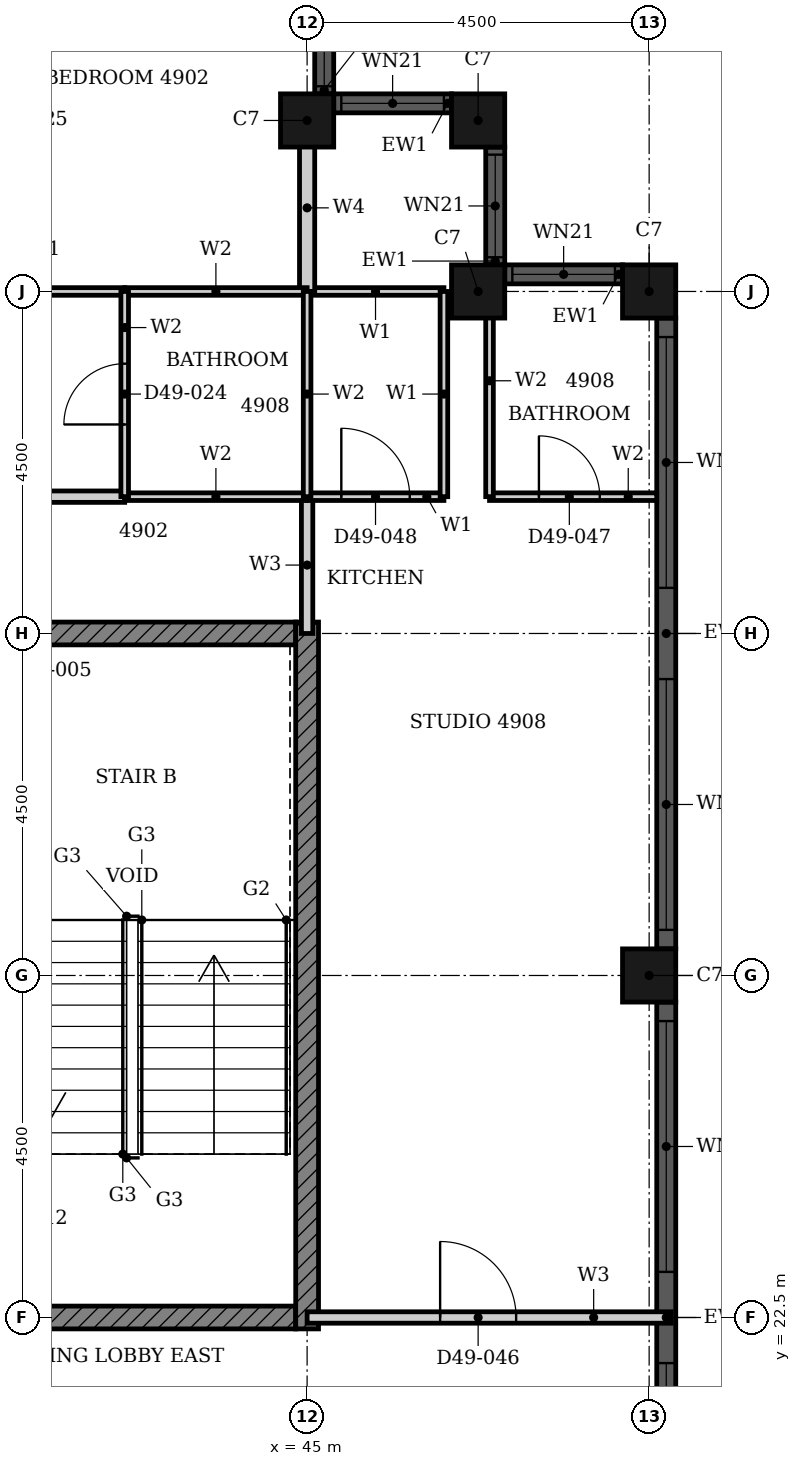
"""IFC4 building model, lengths in metres.
Left out: names, types, materials, properties, quantities, classifications, styles, units other than length and angle.
Written with IfcOpenShell. Run it as: python <this file> out.ifc"""

import sys

from ifc_helpers import new_model, si_unit, direction, frame, frame_2d, origin, origin_2d, place, context, subcontext, project, spatial, rectangle, hollow_rectangle, extrude, element, fill, save


model = new_model("IFC4")
c1 = context("Model", 3, precision=1e-05, world=origin(), true_north=direction((0.0, 1.0)))
c2 = subcontext(c1, "Body", "Model", "MODEL_VIEW")
j1 = project(units=[si_unit("LENGTHUNIT", "METRE"), si_unit("PLANEANGLEUNIT", "RADIAN")], contexts=[c1])
p1 = place(None, origin())
s1 = spatial("IfcSite", under=j1, at=p1, CompositionType="ELEMENT")
p2 = place(p1, origin())
s2 = spatial("IfcBuilding", under=s1, at=p2, CompositionType="ELEMENT")
p3 = place(p2, frame((0.0, 0.0, 196.1)))
s3 = spatial("IfcBuildingStorey", under=s2, at=p3, CompositionType="ELEMENT", Elevation=196.1)
for number, where, z_axis, x_axis in (
    (1, (49.5, 27.0, 0.0), (0.0, 0.0, 1.0), (1.0, 0.0, 0.0)),
    (2, (49.5, 36.0, 0.0), (0.0, 0.0, 1.0), (1.0, 0.0, 0.0)),
    (3, (47.25, 36.0, 0.0), (0.0, 0.0, 1.0), (1.0, 0.0, 0.0)),
    (4, (47.25, 38.25, 0.0), (0.0, 0.0, 1.0), (1.0, 0.0, 0.0)),
    (5, (45.0, 38.25, 0.0), (0.0, 0.0, 1.0), (1.0, 0.0, 0.0)),
):
    element("IfcColumn", number, at=place(p3, frame(where, z_axis=z_axis, x_axis=x_axis)), inside=s3, PredefinedType="COLUMN", context=c2, shape_type="SweptSolid", body=[
        extrude(hollow_rectangle(XDim=0.7, YDim=0.7, WallThickness=0.022, at=origin_2d()), origin(), (0.0, 0.0, 1.0), 3.7),
    ])
p4 = place(p3, frame((49.725, 18.35, 0.0), z_axis=(0.0, 0.0, 1.0), x_axis=(0.0, 1.0, 0.0)))
e6 = element("IfcWall", 6, at=p4, inside=s3, PredefinedType="SOLIDWALL", context=c2, shape_type="SweptSolid", body=[
    extrude(rectangle(XDim=8.3, YDim=0.25, at=frame_2d((4.15, 0.0))), origin(), (0.0, 0.0, 1.0), 3.7),
])
p5 = place(p4, frame((0.25, 0.0, 0.45)))
e7 = element("IfcOpeningElement", 7, at=p5, cuts=e6, PredefinedType="OPENING", context=c2, shape_type="SweptSolid", body=[
    extrude(rectangle(XDim=3.3, YDim=2.3, at=frame_2d((1.65, 1.15))), frame((0.0, 0.135, 0.0), z_axis=(0.0, -1.0, 0.0), x_axis=(1.0, 0.0, 0.0)), (0.0, 0.0, 1.0), 0.27),
])
p6 = place(p4, frame((4.75, 0.0, 0.45)))
e8 = element("IfcOpeningElement", 8, at=p6, cuts=e6, PredefinedType="OPENING", context=c2, shape_type="SweptSolid", body=[
    extrude(rectangle(XDim=3.3, YDim=2.3, at=frame_2d((1.65, 1.15))), frame((0.0, 0.135, 0.0), z_axis=(0.0, -1.0, 0.0), x_axis=(1.0, 0.0, 0.0)), (0.0, 0.0, 1.0), 0.27),
])
p7 = place(p3, frame((49.725, 27.35, 0.0), z_axis=(0.0, 0.0, 1.0), x_axis=(0.0, 1.0, 0.0)))
e9 = element("IfcWall", 9, at=p7, inside=s3, PredefinedType="SOLIDWALL", context=c2, shape_type="SweptSolid", body=[
    extrude(rectangle(XDim=8.3, YDim=0.25, at=frame_2d((4.15, 0.0))), origin(), (0.0, 0.0, 1.0), 3.7),
])
p8 = place(p7, frame((0.25, 0.0, 0.45)))
e10 = element("IfcOpeningElement", 10, at=p8, cuts=e9, PredefinedType="OPENING", context=c2, shape_type="SweptSolid", body=[
    extrude(rectangle(XDim=3.3, YDim=2.3, at=frame_2d((1.65, 1.15))), frame((0.0, 0.135, 0.0), z_axis=(0.0, -1.0, 0.0), x_axis=(1.0, 0.0, 0.0)), (0.0, 0.0, 1.0), 0.27),
])
p9 = place(p7, frame((4.75, 0.0, 0.45)))
e11 = element("IfcOpeningElement", 11, at=p9, cuts=e9, PredefinedType="OPENING", context=c2, shape_type="SweptSolid", body=[
    extrude(rectangle(XDim=3.3, YDim=2.3, at=frame_2d((1.65, 1.15))), frame((0.0, 0.135, 0.0), z_axis=(0.0, -1.0, 0.0), x_axis=(1.0, 0.0, 0.0)), (0.0, 0.0, 1.0), 0.27),
])
p10 = place(p3, frame((49.15, 36.225, 0.0), z_axis=(0.0, 0.0, 1.0), x_axis=(-1.0, 0.0, 0.0)))
e12 = element("IfcWall", 12, at=p10, inside=s3, PredefinedType="SOLIDWALL", context=c2, shape_type="SweptSolid", body=[
    extrude(rectangle(XDim=1.55, YDim=0.25, at=frame_2d((0.775, 0.0))), origin(), (0.0, 0.0, 1.0), 3.7),
])
p11 = place(p10, frame((0.1, 0.0, 0.9)))
e13 = element("IfcOpeningElement", 13, at=p11, cuts=e12, PredefinedType="OPENING", context=c2, shape_type="SweptSolid", body=[
    extrude(rectangle(XDim=1.35, YDim=1.85, at=frame_2d((0.675, 0.925))), frame((0.0, 0.135, 0.0), z_axis=(0.0, -1.0, 0.0), x_axis=(1.0, 0.0, 0.0)), (0.0, 0.0, 1.0), 0.27),
])
p12 = place(p3, frame((47.475, 36.35, 0.0), z_axis=(0.0, 0.0, 1.0), x_axis=(0.0, 1.0, 0.0)))
e14 = element("IfcWall", 14, at=p12, inside=s3, PredefinedType="SOLIDWALL", context=c2, shape_type="SweptSolid", body=[
    extrude(rectangle(XDim=1.55, YDim=0.25, at=frame_2d((0.775, 0.0))), origin(), (0.0, 0.0, 1.0), 3.7),
])
p13 = place(p12, frame((0.1, 0.0, 0.9)))
e15 = element("IfcOpeningElement", 15, at=p13, cuts=e14, PredefinedType="OPENING", context=c2, shape_type="SweptSolid", body=[
    extrude(rectangle(XDim=1.35, YDim=1.85, at=frame_2d((0.675, 0.925))), frame((0.0, 0.135, 0.0), z_axis=(0.0, -1.0, 0.0), x_axis=(1.0, 0.0, 0.0)), (0.0, 0.0, 1.0), 0.27),
])
p14 = place(p3, frame((46.9, 38.475, 0.0), z_axis=(0.0, 0.0, 1.0), x_axis=(-1.0, 0.0, 0.0)))
e16 = element("IfcWall", 16, at=p14, inside=s3, PredefinedType="SOLIDWALL", context=c2, shape_type="SweptSolid", body=[
    extrude(rectangle(XDim=1.55, YDim=0.25, at=frame_2d((0.775, 0.0))), origin(), (0.0, 0.0, 1.0), 3.7),
])
p15 = place(p14, frame((0.1, 0.0, 0.9)))
e17 = element("IfcOpeningElement", 17, at=p15, cuts=e16, PredefinedType="OPENING", context=c2, shape_type="SweptSolid", body=[
    extrude(rectangle(XDim=1.35, YDim=1.85, at=frame_2d((0.675, 0.925))), frame((0.0, 0.135, 0.0), z_axis=(0.0, -1.0, 0.0), x_axis=(1.0, 0.0, 0.0)), (0.0, 0.0, 1.0), 0.27),
])
p16 = place(p3, frame((45.225, 38.6, 0.0), z_axis=(0.0, 0.0, 1.0), x_axis=(0.0, 1.0, 0.0)))
e18 = element("IfcWall", 18, at=p16, inside=s3, PredefinedType="SOLIDWALL", context=c2, shape_type="SweptSolid", body=[
    extrude(rectangle(XDim=1.55, YDim=0.25, at=frame_2d((0.775, 0.0))), origin(), (0.0, 0.0, 1.0), 3.7),
])
p17 = place(p16, frame((0.1, 0.0, 0.9)))
e19 = element("IfcOpeningElement", 19, at=p17, cuts=e18, PredefinedType="OPENING", context=c2, shape_type="SweptSolid", body=[
    extrude(rectangle(XDim=1.35, YDim=1.85, at=frame_2d((0.675, 0.925))), frame((0.0, 0.135, 0.0), z_axis=(0.0, -1.0, 0.0), x_axis=(1.0, 0.0, 0.0)), (0.0, 0.0, 1.0), 0.27),
])
p18 = place(p3, frame((32.911, 22.5, 0.0), z_axis=(0.0, 0.0, 1.0), x_axis=(1.0, 0.0, 0.0)))
e20 = element("IfcWall", 20, at=p18, inside=s3, PredefinedType="SHEAR", context=c2, shape_type="SweptSolid", body=[
    extrude(rectangle(XDim=11.939, YDim=0.3, at=frame_2d((5.97, 0.0))), origin(), (0.0, 0.0, 1.0), 3.4),
])
p19 = place(p18, frame((5.404, 0.0, 0.0)))
e21 = element("IfcOpeningElement", 21, at=p19, cuts=e20, PredefinedType="OPENING", context=c2, shape_type="SweptSolid", body=[
    extrude(rectangle(XDim=1.8, YDim=2.1, at=frame_2d((0.9, 1.05))), frame((0.0, 0.16, 0.0), z_axis=(0.0, -1.0, 0.0), x_axis=(1.0, 0.0, 0.0)), (0.0, 0.0, 1.0), 0.32),
])
p20 = place(p3, frame((40.625, 31.5, 0.0), z_axis=(0.0, 0.0, 1.0), x_axis=(1.0, 0.0, 0.0)))
e22 = element("IfcWall", 22, at=p20, inside=s3, PredefinedType="SHEAR", context=c2, shape_type="SweptSolid", body=[
    extrude(rectangle(XDim=4.225, YDim=0.3, at=frame_2d((2.113, 0.0))), origin(), (0.0, 0.0, 1.0), 3.4),
])
p21 = place(p3, frame((45.0, 22.35, 0.0), z_axis=(0.0, 0.0, 1.0), x_axis=(0.0, 1.0, 0.0)))
e23 = element("IfcWall", 23, at=p21, inside=s3, PredefinedType="SHEAR", context=c2, shape_type="SweptSolid", body=[
    extrude(rectangle(XDim=9.3, YDim=0.3, at=frame_2d((4.65, 0.0))), origin(), (0.0, 0.0, 1.0), 3.4),
])
p22 = place(p3, frame((45.0, 22.5, 0.0), z_axis=(0.0, 0.0, 1.0), x_axis=(1.0, 0.0, 0.0)))
e24 = element("IfcWall", 24, at=p22, inside=s3, PredefinedType="PARTITIONING", context=c2, shape_type="SweptSolid", body=[
    extrude(rectangle(XDim=4.79, YDim=0.15, at=frame_2d((2.395, 0.0))), origin(), (0.0, 0.0, 1.0), 3.4),
])
p23 = place(p22, frame((1.75, 0.0, 0.0)))
e25 = element("IfcOpeningElement", 25, at=p23, cuts=e24, PredefinedType="OPENING", context=c2, shape_type="SweptSolid", body=[
    extrude(rectangle(XDim=1.0, YDim=2.2, at=frame_2d((0.5, 1.1))), frame((0.0, 0.085, 0.0), z_axis=(0.0, -1.0, 0.0), x_axis=(1.0, 0.0, 0.0)), (0.0, 0.0, 1.0), 0.17),
])
p24 = place(p3, frame((36.0, 33.3, 0.0), z_axis=(0.0, 0.0, 1.0), x_axis=(1.0, 0.0, 0.0)))
e26 = element("IfcWall", 26, at=p24, inside=s3, PredefinedType="PARTITIONING", context=c2, shape_type="SweptSolid", body=[
    extrude(rectangle(XDim=6.6, YDim=0.15, at=frame_2d((3.3, 0.0))), origin(), (0.0, 0.0, 1.0), 3.4),
])
p25 = place(p24, frame((4.3, 0.0, 0.0)))
e27 = element("IfcOpeningElement", 27, at=p25, cuts=e26, PredefinedType="OPENING", context=c2, shape_type="SweptSolid", body=[
    extrude(rectangle(XDim=1.0, YDim=2.2, at=frame_2d((0.5, 1.1))), frame((0.0, 0.085, 0.0), z_axis=(0.0, -1.0, 0.0), x_axis=(1.0, 0.0, 0.0)), (0.0, 0.0, 1.0), 0.17),
])
p26 = place(p3, frame((45.0, 31.5, 0.0), z_axis=(0.0, 0.0, 1.0), x_axis=(0.0, 1.0, 0.0)))
e28 = element("IfcWall", 28, at=p26, inside=s3, PredefinedType="PARTITIONING", context=c2, shape_type="SweptSolid", body=[
    extrude(rectangle(XDim=1.8, YDim=0.15, at=frame_2d((0.9, 0.0))), origin(), (0.0, 0.0, 1.0), 3.4),
])
p27 = place(p3, frame((45.0, 33.3, 0.0), z_axis=(0.0, 0.0, 1.0), x_axis=(1.0, 0.0, 0.0)))
e29 = element("IfcWall", 29, at=p27, inside=s3, PredefinedType="PARTITIONING", context=c2, shape_type="SweptSolid", body=[
    extrude(rectangle(XDim=1.8, YDim=0.1, at=frame_2d((0.9, 0.0))), origin(), (0.0, 0.0, 1.0), 3.4),
])
p28 = place(p27, frame((0.45, 0.0, 0.0)))
e30 = element("IfcOpeningElement", 30, at=p28, cuts=e29, PredefinedType="OPENING", context=c2, shape_type="SweptSolid", body=[
    extrude(rectangle(XDim=0.9, YDim=2.1, at=frame_2d((0.45, 1.05))), frame((0.0, 0.06, 0.0), z_axis=(0.0, -1.0, 0.0), x_axis=(1.0, 0.0, 0.0)), (0.0, 0.0, 1.0), 0.12),
])
p29 = place(p3, frame((40.5, 36.0, 0.0), z_axis=(0.0, 0.0, 1.0), x_axis=(1.0, 0.0, 0.0)))
e31 = element("IfcWall", 31, at=p29, inside=s3, PredefinedType="PARTITIONING", context=c2, shape_type="SweptSolid", body=[
    extrude(rectangle(XDim=2.1, YDim=0.1, at=frame_2d((1.05, 0.0))), origin(), (0.0, 0.0, 1.0), 3.4),
])
p30 = place(p3, frame((45.0, 36.0, 0.0), z_axis=(0.0, 0.0, 1.0), x_axis=(1.0, 0.0, 0.0)))
e32 = element("IfcWall", 32, at=p30, inside=s3, PredefinedType="PARTITIONING", context=c2, shape_type="SweptSolid", body=[
    extrude(rectangle(XDim=1.8, YDim=0.1, at=frame_2d((0.9, 0.0))), origin(), (0.0, 0.0, 1.0), 3.4),
])
p31 = place(p3, frame((46.8, 33.3, 0.0), z_axis=(0.0, 0.0, 1.0), x_axis=(0.0, 1.0, 0.0)))
e33 = element("IfcWall", 33, at=p31, inside=s3, PredefinedType="PARTITIONING", context=c2, shape_type="SweptSolid", body=[
    extrude(rectangle(XDim=2.7, YDim=0.1, at=frame_2d((1.35, 0.0))), origin(), (0.0, 0.0, 1.0), 3.4),
])
p32 = place(p3, frame((45.0, 36.0, 0.0), z_axis=(0.0, 0.0, 1.0), x_axis=(0.0, 1.0, 0.0)))
e34 = element("IfcWall", 34, at=p32, inside=s3, PredefinedType="PARTITIONING", context=c2, shape_type="SweptSolid", body=[
    extrude(rectangle(XDim=2.2, YDim=0.2, at=frame_2d((1.1, 0.0))), origin(), (0.0, 0.0, 1.0), 3.4),
])
p33 = place(p3, frame((42.6, 33.3, 0.0), z_axis=(0.0, 0.0, 1.0), x_axis=(1.0, 0.0, 0.0)))
e35 = element("IfcWall", 35, at=p33, inside=s3, PredefinedType="PARTITIONING", context=c2, shape_type="SweptSolid", body=[
    extrude(rectangle(XDim=2.4, YDim=0.1, at=frame_2d((1.2, 0.0))), origin(), (0.0, 0.0, 1.0), 3.4),
])
p34 = place(p3, frame((47.4, 33.3, 0.0), z_axis=(0.0, 0.0, 1.0), x_axis=(1.0, 0.0, 0.0)))
e36 = element("IfcWall", 36, at=p34, inside=s3, PredefinedType="PARTITIONING", context=c2, shape_type="SweptSolid", body=[
    extrude(rectangle(XDim=2.2, YDim=0.1, at=frame_2d((1.1, 0.0))), origin(), (0.0, 0.0, 1.0), 3.4),
])
p35 = place(p34, frame((0.65, 0.0, 0.0)))
e37 = element("IfcOpeningElement", 37, at=p35, cuts=e36, PredefinedType="OPENING", context=c2, shape_type="SweptSolid", body=[
    extrude(rectangle(XDim=0.8, YDim=2.1, at=frame_2d((0.4, 1.05))), frame((0.0, 0.06, 0.0), z_axis=(0.0, -1.0, 0.0), x_axis=(1.0, 0.0, 0.0)), (0.0, 0.0, 1.0), 0.12),
])
p36 = place(p3, frame((42.6, 36.0, 0.0), z_axis=(0.0, 0.0, 1.0), x_axis=(1.0, 0.0, 0.0)))
e38 = element("IfcWall", 38, at=p36, inside=s3, PredefinedType="PARTITIONING", context=c2, shape_type="SweptSolid", body=[
    extrude(rectangle(XDim=2.4, YDim=0.1, at=frame_2d((1.2, 0.0))), origin(), (0.0, 0.0, 1.0), 3.4),
])
p37 = place(p3, frame((42.6, 33.3, 0.0), z_axis=(0.0, 0.0, 1.0), x_axis=(0.0, 1.0, 0.0)))
e39 = element("IfcWall", 39, at=p37, inside=s3, PredefinedType="PARTITIONING", context=c2, shape_type="SweptSolid", body=[
    extrude(rectangle(XDim=2.7, YDim=0.1, at=frame_2d((1.35, 0.0))), origin(), (0.0, 0.0, 1.0), 3.4),
])
p38 = place(p37, frame((0.95, 0.0, 0.0)))
e40 = element("IfcOpeningElement", 40, at=p38, cuts=e39, PredefinedType="OPENING", context=c2, shape_type="SweptSolid", body=[
    extrude(rectangle(XDim=0.8, YDim=2.1, at=frame_2d((0.4, 1.05))), frame((0.0, 0.06, 0.0), z_axis=(0.0, -1.0, 0.0), x_axis=(1.0, 0.0, 0.0)), (0.0, 0.0, 1.0), 0.12),
])
p39 = place(p3, frame((45.0, 33.3, 0.0), z_axis=(0.0, 0.0, 1.0), x_axis=(0.0, 1.0, 0.0)))
e41 = element("IfcWall", 41, at=p39, inside=s3, PredefinedType="PARTITIONING", context=c2, shape_type="SweptSolid", body=[
    extrude(rectangle(XDim=2.7, YDim=0.1, at=frame_2d((1.35, 0.0))), origin(), (0.0, 0.0, 1.0), 3.4),
])
p40 = place(p3, frame((47.4, 33.3, 0.0), z_axis=(0.0, 0.0, 1.0), x_axis=(0.0, 1.0, 0.0)))
e42 = element("IfcWall", 42, at=p40, inside=s3, PredefinedType="PARTITIONING", context=c2, shape_type="SweptSolid", body=[
    extrude(rectangle(XDim=3.05, YDim=0.1, at=frame_2d((1.525, 0.0))), origin(), (0.0, 0.0, 1.0), 3.4),
])
p41 = place(p5, origin())
e43 = element("IfcWindow", 43, at=p41, inside=s3, PartitioningType="SINGLE_PANEL", PredefinedType="WINDOW", context=c2, shape_type="SweptSolid", body=[
    extrude(rectangle(XDim=3.3, YDim=2.3, at=frame_2d((1.65, 1.15))), frame((0.0, 0.03, 0.0), z_axis=(0.0, -1.0, 0.0), x_axis=(1.0, 0.0, 0.0)), (0.0, 0.0, 1.0), 0.06),
])
fill(e7, e43)
p42 = place(p6, origin())
e44 = element("IfcWindow", 44, at=p42, inside=s3, PartitioningType="SINGLE_PANEL", PredefinedType="WINDOW", context=c2, shape_type="SweptSolid", body=[
    extrude(rectangle(XDim=3.3, YDim=2.3, at=frame_2d((1.65, 1.15))), frame((0.0, 0.03, 0.0), z_axis=(0.0, -1.0, 0.0), x_axis=(1.0, 0.0, 0.0)), (0.0, 0.0, 1.0), 0.06),
])
fill(e8, e44)
p43 = place(p8, origin())
e45 = element("IfcWindow", 45, at=p43, inside=s3, PartitioningType="SINGLE_PANEL", PredefinedType="WINDOW", context=c2, shape_type="SweptSolid", body=[
    extrude(rectangle(XDim=3.3, YDim=2.3, at=frame_2d((1.65, 1.15))), frame((0.0, 0.03, 0.0), z_axis=(0.0, -1.0, 0.0), x_axis=(1.0, 0.0, 0.0)), (0.0, 0.0, 1.0), 0.06),
])
fill(e10, e45)
p44 = place(p9, origin())
e46 = element("IfcWindow", 46, at=p44, inside=s3, PartitioningType="SINGLE_PANEL", PredefinedType="WINDOW", context=c2, shape_type="SweptSolid", body=[
    extrude(rectangle(XDim=3.3, YDim=2.3, at=frame_2d((1.65, 1.15))), frame((0.0, 0.03, 0.0), z_axis=(0.0, -1.0, 0.0), x_axis=(1.0, 0.0, 0.0)), (0.0, 0.0, 1.0), 0.06),
])
fill(e11, e46)
p45 = place(p11, origin())
e47 = element("IfcWindow", 47, at=p45, inside=s3, PartitioningType="SINGLE_PANEL", PredefinedType="WINDOW", context=c2, shape_type="SweptSolid", body=[
    extrude(rectangle(XDim=1.35, YDim=1.85, at=frame_2d((0.675, 0.925))), frame((0.0, 0.03, 0.0), z_axis=(0.0, -1.0, 0.0), x_axis=(1.0, 0.0, 0.0)), (0.0, 0.0, 1.0), 0.06),
])
fill(e13, e47)
p46 = place(p13, origin())
e48 = element("IfcWindow", 48, at=p46, inside=s3, PartitioningType="SINGLE_PANEL", PredefinedType="WINDOW", context=c2, shape_type="SweptSolid", body=[
    extrude(rectangle(XDim=1.35, YDim=1.85, at=frame_2d((0.675, 0.925))), frame((0.0, 0.03, 0.0), z_axis=(0.0, -1.0, 0.0), x_axis=(1.0, 0.0, 0.0)), (0.0, 0.0, 1.0), 0.06),
])
fill(e15, e48)
p47 = place(p15, origin())
e49 = element("IfcWindow", 49, at=p47, inside=s3, PartitioningType="SINGLE_PANEL", PredefinedType="WINDOW", context=c2, shape_type="SweptSolid", body=[
    extrude(rectangle(XDim=1.35, YDim=1.85, at=frame_2d((0.675, 0.925))), frame((0.0, 0.03, 0.0), z_axis=(0.0, -1.0, 0.0), x_axis=(1.0, 0.0, 0.0)), (0.0, 0.0, 1.0), 0.06),
])
fill(e17, e49)
p48 = place(p17, origin())
e50 = element("IfcWindow", 50, at=p48, inside=s3, PartitioningType="SINGLE_PANEL", PredefinedType="WINDOW", context=c2, shape_type="SweptSolid", body=[
    extrude(rectangle(XDim=1.35, YDim=1.85, at=frame_2d((0.675, 0.925))), frame((0.0, 0.03, 0.0), z_axis=(0.0, -1.0, 0.0), x_axis=(1.0, 0.0, 0.0)), (0.0, 0.0, 1.0), 0.06),
])
fill(e19, e50)
p49 = place(p38, origin())
e51 = element("IfcDoor", 51, at=p49, inside=s3, OperationType="SINGLE_SWING_RIGHT", PredefinedType="DOOR", context=c2, shape_type="SweptSolid", body=[
    extrude(rectangle(XDim=0.8, YDim=2.1, at=frame_2d((0.4, 1.05))), frame((0.0, 0.025, 0.0), z_axis=(0.0, -1.0, 0.0), x_axis=(1.0, 0.0, 0.0)), (0.0, 0.0, 1.0), 0.05),
])
fill(e40, e51)
p50 = place(p23, origin())
e52 = element("IfcDoor", 52, at=p50, inside=s3, OperationType="SINGLE_SWING_LEFT", PredefinedType="DOOR", context=c2, shape_type="SweptSolid", body=[
    extrude(rectangle(XDim=1.0, YDim=2.2, at=frame_2d((0.5, 1.1))), frame((0.0, 0.025, 0.0), z_axis=(0.0, -1.0, 0.0), x_axis=(1.0, 0.0, 0.0)), (0.0, 0.0, 1.0), 0.05),
])
fill(e25, e52)
p51 = place(p35, origin())
e53 = element("IfcDoor", 53, at=p51, inside=s3, OperationType="SINGLE_SWING_LEFT", PredefinedType="DOOR", context=c2, shape_type="SweptSolid", body=[
    extrude(rectangle(XDim=0.8, YDim=2.1, at=frame_2d((0.4, 1.05))), frame((0.0, 0.025, 0.0), z_axis=(0.0, -1.0, 0.0), x_axis=(1.0, 0.0, 0.0)), (0.0, 0.0, 1.0), 0.05),
])
fill(e37, e53)
p52 = place(p28, origin())
e54 = element("IfcDoor", 54, at=p52, inside=s3, OperationType="SINGLE_SWING_RIGHT", PredefinedType="DOOR", context=c2, shape_type="SweptSolid", body=[
    extrude(rectangle(XDim=0.9, YDim=2.1, at=frame_2d((0.45, 1.05))), frame((0.0, 0.025, 0.0), z_axis=(0.0, -1.0, 0.0), x_axis=(1.0, 0.0, 0.0)), (0.0, 0.0, 1.0), 0.05),
])
fill(e30, e54)
save(model, sys.argv[1])
